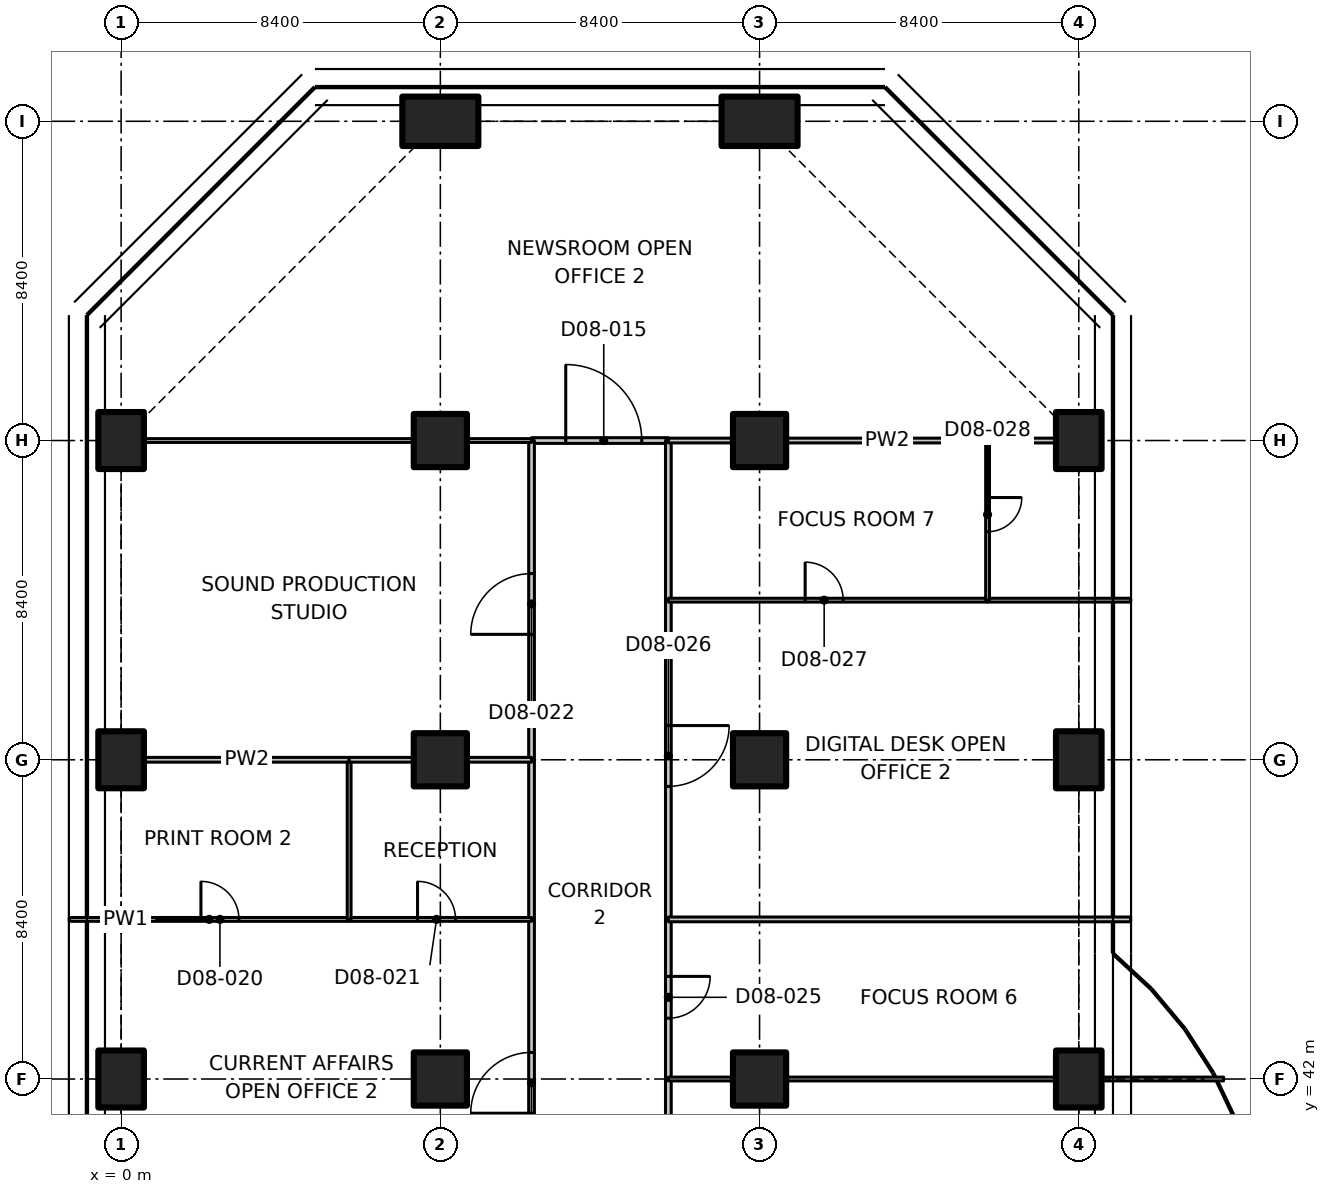
"""IFC4 building model, lengths in metres.
Left out: names, types, materials, properties, quantities, classifications, styles, units other than length and angle.
Written with IfcOpenShell. Run it as: python <this file> out.ifc"""

import sys

from ifc_helpers import new_model, si_unit, direction, frame, frame_2d, origin, origin_2d, place, context, subcontext, project, spatial, polyline, rectangle, outline, extrude, element, fill, save


model = new_model("IFC4")
c1 = context("Model", 3, precision=1e-05, world=origin(), true_north=direction((0.0, 1.0)))
c2 = subcontext(c1, "Body", "Model", "MODEL_VIEW")
j1 = project(units=[si_unit("LENGTHUNIT", "METRE"), si_unit("PLANEANGLEUNIT", "RADIAN")], contexts=[c1])
p1 = place(None, origin())
s1 = spatial("IfcSite", under=j1, at=p1, CompositionType="ELEMENT")
p2 = place(p1, origin())
s2 = spatial("IfcBuilding", under=s1, at=p2, CompositionType="ELEMENT")
p3 = place(p2, frame((0.0, 0.0, 54.5)))
s3 = spatial("IfcBuildingStorey", under=s2, at=p3, CompositionType="ELEMENT", Elevation=54.5)
for number, where, z_axis, x_axis in (
    (1, (0.0, 42.0, 0.0), (0.0, 0.0, 1.0), (1.0, 0.0, 0.0)),
    (2, (0.0, 50.4, 0.0), (0.0, 0.0, 1.0), (1.0, 0.0, 0.0)),
    (3, (0.0, 58.8, 0.0), (0.0, 0.0, 1.0), (1.0, 0.0, 0.0)),
):
    element("IfcColumn", number, at=place(p3, frame(where, z_axis=z_axis, x_axis=x_axis)), inside=s3, PredefinedType="COLUMN", context=c2, shape_type="SweptSolid", body=[
        extrude(rectangle(XDim=1.2, YDim=1.5, at=origin_2d()), origin(), (0.0, 0.0, 1.0), 3.35),
    ])
for number, where, z_axis, x_axis in (
    (4, (8.4, 42.0, 0.0), (0.0, 0.0, 1.0), (1.0, 0.0, 0.0)),
    (5, (8.4, 50.4, 0.0), (0.0, 0.0, 1.0), (1.0, 0.0, 0.0)),
    (6, (8.4, 58.8, 0.0), (0.0, 0.0, 1.0), (1.0, 0.0, 0.0)),
):
    element("IfcColumn", number, at=place(p3, frame(where, z_axis=z_axis, x_axis=x_axis)), inside=s3, PredefinedType="COLUMN", context=c2, shape_type="SweptSolid", body=[
        extrude(rectangle(XDim=1.4, YDim=1.4, at=origin_2d()), origin(), (0.0, 0.0, 1.0), 3.35),
    ])
p4 = place(p3, frame((8.4, 67.2, 0.0), z_axis=(0.0, 0.0, 1.0), x_axis=(0.0, 1.0, 0.0)))
e7 = element("IfcColumn", 7, at=p4, inside=s3, PredefinedType="COLUMN", context=c2, shape_type="SweptSolid", body=[
    extrude(rectangle(XDim=1.3, YDim=2.0, at=origin_2d()), origin(), (0.0, 0.0, 1.0), 3.35),
])
for number, where, z_axis, x_axis in (
    (8, (16.8, 42.0, 0.0), (0.0, 0.0, 1.0), (1.0, 0.0, 0.0)),
    (9, (16.8, 50.4, 0.0), (0.0, 0.0, 1.0), (1.0, 0.0, 0.0)),
    (10, (16.8, 58.8, 0.0), (0.0, 0.0, 1.0), (1.0, 0.0, 0.0)),
):
    element("IfcColumn", number, at=place(p3, frame(where, z_axis=z_axis, x_axis=x_axis)), inside=s3, PredefinedType="COLUMN", context=c2, shape_type="SweptSolid", body=[
        extrude(rectangle(XDim=1.4, YDim=1.4, at=origin_2d()), origin(), (0.0, 0.0, 1.0), 3.35),
    ])
p5 = place(p3, frame((16.8, 67.2, 0.0), z_axis=(0.0, 0.0, 1.0), x_axis=(0.0, 1.0, 0.0)))
e11 = element("IfcColumn", 11, at=p5, inside=s3, PredefinedType="COLUMN", context=c2, shape_type="SweptSolid", body=[
    extrude(rectangle(XDim=1.3, YDim=2.0, at=origin_2d()), origin(), (0.0, 0.0, 1.0), 3.35),
])
for number, where, z_axis, x_axis in (
    (12, (25.2, 42.0, 0.0), (0.0, 0.0, 1.0), (1.0, 0.0, 0.0)),
    (13, (25.2, 50.4, 0.0), (0.0, 0.0, 1.0), (1.0, 0.0, 0.0)),
    (14, (25.2, 58.8, 0.0), (0.0, 0.0, 1.0), (1.0, 0.0, 0.0)),
):
    element("IfcColumn", number, at=place(p3, frame(where, z_axis=z_axis, x_axis=x_axis)), inside=s3, PredefinedType="COLUMN", context=c2, shape_type="SweptSolid", body=[
        extrude(rectangle(XDim=1.2, YDim=1.5, at=origin_2d()), origin(), (0.0, 0.0, 1.0), 3.35),
    ])
p6 = place(p3, frame((10.8, 58.8, 0.0), z_axis=(0.0, 0.0, 1.0), x_axis=(1.0, 0.0, 0.0)))
e15 = element("IfcWall", 15, at=p6, inside=s3, PredefinedType="PARTITIONING", context=c2, shape_type="SweptSolid", body=[
    extrude(rectangle(XDim=3.6, YDim=0.15, at=frame_2d((1.8, 0.0))), origin(), (0.0, 0.0, 1.0), 3.33),
])
p7 = place(p6, frame((0.9, 0.0, 0.0)))
e16 = element("IfcOpeningElement", 16, at=p7, cuts=e15, PredefinedType="OPENING", context=c2, shape_type="SweptSolid", body=[
    extrude(rectangle(XDim=2.0, YDim=2.4, at=frame_2d((1.0, 1.2))), frame((0.0, 0.085, 0.0), z_axis=(0.0, -1.0, 0.0), x_axis=(1.0, 0.0, 0.0)), (0.0, 0.0, 1.0), 0.17),
])
p8 = place(p3, frame((10.8, 37.8, 0.0), z_axis=(0.0, 0.0, 1.0), x_axis=(0.0, 1.0, 0.0)))
e17 = element("IfcWall", 17, at=p8, inside=s3, PredefinedType="PARTITIONING", context=c2, shape_type="SweptSolid", body=[
    extrude(rectangle(XDim=8.4, YDim=0.15, at=frame_2d((4.2, 0.0))), origin(), (0.0, 0.0, 1.0), 3.33),
])
p9 = place(p8, frame((3.3, 0.0, 0.0)))
e18 = element("IfcOpeningElement", 18, at=p9, cuts=e17, PredefinedType="OPENING", context=c2, shape_type="SweptSolid", body=[
    extrude(rectangle(XDim=1.6, YDim=2.1, at=frame_2d((0.8, 1.05))), frame((0.0, 0.085, 0.0), z_axis=(0.0, -1.0, 0.0), x_axis=(1.0, 0.0, 0.0)), (0.0, 0.0, 1.0), 0.17),
])
p10 = place(p3, frame((10.8, 46.2, 0.0), z_axis=(0.0, 0.0, 1.0), x_axis=(0.0, 1.0, 0.0)))
e19 = element("IfcWall", 19, at=p10, inside=s3, PredefinedType="PARTITIONING", context=c2, shape_type="SweptSolid", body=[
    extrude(rectangle(XDim=4.2, YDim=0.15, at=frame_2d((2.1, 0.0))), origin(), (0.0, 0.0, 1.0), 3.33),
])
p11 = place(p3, frame((10.8, 50.4, 0.0), z_axis=(0.0, 0.0, 1.0), x_axis=(0.0, 1.0, 0.0)))
e20 = element("IfcWall", 20, at=p11, inside=s3, PredefinedType="PARTITIONING", context=c2, shape_type="SweptSolid", body=[
    extrude(rectangle(XDim=8.4, YDim=0.15, at=frame_2d((4.2, 0.0))), origin(), (0.0, 0.0, 1.0), 3.33),
])
p12 = place(p11, frame((3.3, 0.0, 0.0)))
e21 = element("IfcOpeningElement", 21, at=p12, cuts=e20, PredefinedType="OPENING", context=c2, shape_type="SweptSolid", body=[
    extrude(rectangle(XDim=1.6, YDim=2.1, at=frame_2d((0.8, 1.05))), frame((0.0, 0.085, 0.0), z_axis=(0.0, -1.0, 0.0), x_axis=(1.0, 0.0, 0.0)), (0.0, 0.0, 1.0), 0.17),
])
p13 = place(p3, frame((14.4, 42.0, 0.0), z_axis=(0.0, 0.0, 1.0), x_axis=(0.0, -1.0, 0.0)))
e22 = element("IfcWall", 22, at=p13, inside=s3, PredefinedType="PARTITIONING", context=c2, shape_type="SweptSolid", body=[
    extrude(rectangle(XDim=4.2, YDim=0.15, at=frame_2d((2.1, 0.0))), origin(), (0.0, 0.0, 1.0), 3.33),
])
p14 = place(p13, frame((1.2, 0.0, 0.0)))
e23 = element("IfcOpeningElement", 23, at=p14, cuts=e22, PredefinedType="OPENING", context=c2, shape_type="SweptSolid", body=[
    extrude(rectangle(XDim=1.6, YDim=2.1, at=frame_2d((0.8, 1.05))), frame((0.0, 0.085, 0.0), z_axis=(0.0, -1.0, 0.0), x_axis=(1.0, 0.0, 0.0)), (0.0, 0.0, 1.0), 0.17),
])
p15 = place(p3, frame((14.4, 46.2, 0.0), z_axis=(0.0, 0.0, 1.0), x_axis=(0.0, -1.0, 0.0)))
e24 = element("IfcWall", 24, at=p15, inside=s3, PredefinedType="PARTITIONING", context=c2, shape_type="SweptSolid", body=[
    extrude(rectangle(XDim=4.2, YDim=0.15, at=frame_2d((2.1, 0.0))), origin(), (0.0, 0.0, 1.0), 3.33),
])
p16 = place(p15, frame((1.5, 0.0, 0.0)))
e25 = element("IfcOpeningElement", 25, at=p16, cuts=e24, PredefinedType="OPENING", context=c2, shape_type="SweptSolid", body=[
    extrude(rectangle(XDim=1.1, YDim=2.1, at=frame_2d((0.55, 1.05))), frame((0.0, 0.085, 0.0), z_axis=(0.0, -1.0, 0.0), x_axis=(1.0, 0.0, 0.0)), (0.0, 0.0, 1.0), 0.17),
])
p17 = place(p3, frame((14.4, 54.6, 0.0), z_axis=(0.0, 0.0, 1.0), x_axis=(0.0, -1.0, 0.0)))
e26 = element("IfcWall", 26, at=p17, inside=s3, PredefinedType="PARTITIONING", context=c2, shape_type="SweptSolid", body=[
    extrude(rectangle(XDim=8.4, YDim=0.15, at=frame_2d((4.2, 0.0))), origin(), (0.0, 0.0, 1.0), 3.33),
])
p18 = place(p17, frame((3.3, 0.0, 0.0)))
e27 = element("IfcOpeningElement", 27, at=p18, cuts=e26, PredefinedType="OPENING", context=c2, shape_type="SweptSolid", body=[
    extrude(rectangle(XDim=1.6, YDim=2.1, at=frame_2d((0.8, 1.05))), frame((0.0, 0.085, 0.0), z_axis=(0.0, -1.0, 0.0), x_axis=(1.0, 0.0, 0.0)), (0.0, 0.0, 1.0), 0.17),
])
p19 = place(p3, frame((14.4, 58.8, 0.0), z_axis=(0.0, 0.0, 1.0), x_axis=(0.0, -1.0, 0.0)))
e28 = element("IfcWall", 28, at=p19, inside=s3, PredefinedType="PARTITIONING", context=c2, shape_type="SweptSolid", body=[
    extrude(rectangle(XDim=4.2, YDim=0.15, at=frame_2d((2.1, 0.0))), origin(), (0.0, 0.0, 1.0), 3.33),
])
p20 = place(p3, frame((10.8, 58.8, 0.0), z_axis=(0.0, 0.0, 1.0), x_axis=(-1.0, 0.0, 0.0)))
e29 = element("IfcWall", 29, at=p20, inside=s3, PredefinedType="PARTITIONING", context=c2, shape_type="SweptSolid", body=[
    extrude(rectangle(XDim=1.68, YDim=0.1, at=frame_2d((0.84, 0.0))), origin(), (0.0, 0.0, 1.0), 3.33),
])
p21 = place(p3, frame((7.68, 58.8, 0.0), z_axis=(0.0, 0.0, 1.0), x_axis=(-1.0, 0.0, 0.0)))
e30 = element("IfcWall", 30, at=p21, inside=s3, PredefinedType="PARTITIONING", context=c2, shape_type="SweptSolid", body=[
    extrude(rectangle(XDim=7.06, YDim=0.1, at=frame_2d((3.53, 0.0))), origin(), (0.0, 0.0, 1.0), 3.33),
])
p22 = place(p3, frame((22.8, 58.8, 0.0), z_axis=(0.0, 0.0, 1.0), x_axis=(-1.0, 0.0, 0.0)))
e31 = element("IfcWall", 31, at=p22, inside=s3, PredefinedType="PARTITIONING", context=c2, shape_type="SweptSolid", body=[
    extrude(rectangle(XDim=5.28, YDim=0.125, at=frame_2d((2.64, 0.0))), origin(), (0.0, 0.0, 1.0), 3.33),
])
p23 = place(p3, frame((16.08, 58.8, 0.0), z_axis=(0.0, 0.0, 1.0), x_axis=(-1.0, 0.0, 0.0)))
e32 = element("IfcWall", 32, at=p23, inside=s3, PredefinedType="PARTITIONING", context=c2, shape_type="SweptSolid", body=[
    extrude(rectangle(XDim=1.68, YDim=0.125, at=frame_2d((0.84, 0.0))), origin(), (0.0, 0.0, 1.0), 3.33),
])
p24 = place(p3, frame((24.58, 58.8, 0.0), z_axis=(0.0, 0.0, 1.0), x_axis=(-1.0, 0.0, 0.0)))
e33 = element("IfcWall", 33, at=p24, inside=s3, PredefinedType="PARTITIONING", context=c2, shape_type="SweptSolid", body=[
    extrude(rectangle(XDim=1.78, YDim=0.125, at=frame_2d((0.89, 0.0))), origin(), (0.0, 0.0, 1.0), 3.33),
])
p25 = place(p3, frame((-1.365, 46.2, 0.0), z_axis=(0.0, 0.0, 1.0), x_axis=(1.0, 0.0, 0.0)))
e34 = element("IfcWall", 34, at=p25, inside=s3, PredefinedType="PARTITIONING", context=c2, shape_type="SweptSolid", body=[
    extrude(outline(polyline([(0.0, 0.0), (7.365, 0.0), (7.365, 3.33), (1.815, 3.33), (1.813, 2.98), (0.917, 2.98), (0.915, 3.33), (0.265, 3.33), (0.0, 3.33), (0.0, 0.0)])), frame((0.0, 0.05, 0.0), z_axis=(0.0, -1.0, 0.0), x_axis=(1.0, 0.0, 0.0)), (0.0, 0.0, 1.0), 0.1),
])
p26 = place(p25, frame((3.465, 0.0, 0.0)))
e35 = element("IfcOpeningElement", 35, at=p26, cuts=e34, PredefinedType="OPENING", context=c2, shape_type="SweptSolid", body=[
    extrude(rectangle(XDim=1.0, YDim=2.1, at=frame_2d((0.5, 1.05))), frame((0.0, 0.06, 0.0), z_axis=(0.0, -1.0, 0.0), x_axis=(1.0, 0.0, 0.0)), (0.0, 0.0, 1.0), 0.12),
])
p27 = place(p3, frame((6.0, 46.2, 0.0), z_axis=(0.0, 0.0, 1.0), x_axis=(1.0, 0.0, 0.0)))
e36 = element("IfcWall", 36, at=p27, inside=s3, PredefinedType="PARTITIONING", context=c2, shape_type="SweptSolid", body=[
    extrude(rectangle(XDim=4.8, YDim=0.1, at=frame_2d((2.4, 0.0))), origin(), (0.0, 0.0, 1.0), 3.33),
])
p28 = place(p27, frame((1.8, 0.0, 0.0)))
e37 = element("IfcOpeningElement", 37, at=p28, cuts=e36, PredefinedType="OPENING", context=c2, shape_type="SweptSolid", body=[
    extrude(rectangle(XDim=1.0, YDim=2.1, at=frame_2d((0.5, 1.05))), frame((0.0, 0.06, 0.0), z_axis=(0.0, -1.0, 0.0), x_axis=(1.0, 0.0, 0.0)), (0.0, 0.0, 1.0), 0.12),
])
p29 = place(p3, frame((6.0, 50.4, 0.0), z_axis=(0.0, 0.0, 1.0), x_axis=(0.0, -1.0, 0.0)))
e38 = element("IfcWall", 38, at=p29, inside=s3, PredefinedType="PARTITIONING", context=c2, shape_type="SweptSolid", body=[
    extrude(rectangle(XDim=4.2, YDim=0.1, at=frame_2d((2.1, 0.0))), origin(), (0.0, 0.0, 1.0), 3.33),
])
p30 = place(p3, frame((0.62, 50.4, 0.0), z_axis=(0.0, 0.0, 1.0), x_axis=(1.0, 0.0, 0.0)))
e39 = element("IfcWall", 39, at=p30, inside=s3, PredefinedType="PARTITIONING", context=c2, shape_type="SweptSolid", body=[
    extrude(rectangle(XDim=5.38, YDim=0.125, at=frame_2d((2.69, 0.0))), origin(), (0.0, 0.0, 1.0), 3.33),
])
for number, where, z_axis, x_axis in (
    (40, (6.0, 50.4, 0.0), (0.0, 0.0, 1.0), (1.0, 0.0, 0.0)),
    (41, (9.12, 50.4, 0.0), (0.0, 0.0, 1.0), (1.0, 0.0, 0.0)),
):
    element("IfcWall", number, at=place(p3, frame(where, z_axis=z_axis, x_axis=x_axis)), inside=s3, PredefinedType="PARTITIONING", context=c2, shape_type="SweptSolid", body=[
        extrude(rectangle(XDim=1.68, YDim=0.125, at=frame_2d((0.84, 0.0))), origin(), (0.0, 0.0, 1.0), 3.33),
    ])
p31 = place(p3, frame((14.4, 42.0, 0.0), z_axis=(0.0, 0.0, 1.0), x_axis=(1.0, 0.0, 0.0)))
e42 = element("IfcWall", 42, at=p31, inside=s3, PredefinedType="PARTITIONING", context=c2, shape_type="SweptSolid", body=[
    extrude(rectangle(XDim=1.68, YDim=0.1, at=frame_2d((0.84, 0.0))), origin(), (0.0, 0.0, 1.0), 3.33),
])
p32 = place(p3, frame((17.52, 42.0, 0.0), z_axis=(0.0, 0.0, 1.0), x_axis=(1.0, 0.0, 0.0)))
e43 = element("IfcWall", 43, at=p32, inside=s3, PredefinedType="PARTITIONING", context=c2, shape_type="SweptSolid", body=[
    extrude(rectangle(XDim=7.06, YDim=0.1, at=frame_2d((3.53, 0.0))), origin(), (0.0, 0.0, 1.0), 3.33),
])
p33 = place(p3, frame((25.82, 42.0, 0.0), z_axis=(0.0, 0.0, 1.0), x_axis=(1.0, 0.0, 0.0)))
e44 = element("IfcWall", 44, at=p33, inside=s3, PredefinedType="PARTITIONING", context=c2, shape_type="SweptSolid", body=[
    extrude(rectangle(XDim=3.191, YDim=0.1, at=frame_2d((1.596, 0.0))), origin(), (0.0, 0.0, 1.0), 2.98),
])
p34 = place(p3, frame((14.4, 46.2, 0.0), z_axis=(0.0, 0.0, 1.0), x_axis=(1.0, 0.0, 0.0)))
e45 = element("IfcWall", 45, at=p34, inside=s3, PredefinedType="PARTITIONING", context=c2, shape_type="SweptSolid", body=[
    extrude(outline(polyline([(0.0, 0.0), (12.165, 0.0), (12.165, 3.33), (11.9, 3.33), (11.25, 3.33), (11.248, 2.98), (10.352, 2.98), (10.35, 3.33), (0.0, 3.33), (0.0, 0.0)])), frame((0.0, 0.062, 0.0), z_axis=(0.0, -1.0, 0.0), x_axis=(1.0, 0.0, 0.0)), (0.0, 0.0, 1.0), 0.125),
])
p35 = place(p3, frame((14.4, 54.6, 0.0), z_axis=(0.0, 0.0, 1.0), x_axis=(1.0, 0.0, 0.0)))
e46 = element("IfcWall", 46, at=p35, inside=s3, PredefinedType="PARTITIONING", context=c2, shape_type="SweptSolid", body=[
    extrude(rectangle(XDim=8.4, YDim=0.1, at=frame_2d((4.2, 0.0))), origin(), (0.0, 0.0, 1.0), 3.33),
])
p36 = place(p35, frame((3.6, 0.0, 0.0)))
e47 = element("IfcOpeningElement", 47, at=p36, cuts=e46, PredefinedType="OPENING", context=c2, shape_type="SweptSolid", body=[
    extrude(rectangle(XDim=1.0, YDim=2.1, at=frame_2d((0.5, 1.05))), frame((0.0, 0.06, 0.0), z_axis=(0.0, -1.0, 0.0), x_axis=(1.0, 0.0, 0.0)), (0.0, 0.0, 1.0), 0.12),
])
p37 = place(p3, frame((22.8, 54.6, 0.0), z_axis=(0.0, 0.0, 1.0), x_axis=(1.0, 0.0, 0.0)))
e48 = element("IfcWall", 48, at=p37, inside=s3, PredefinedType="PARTITIONING", context=c2, shape_type="SweptSolid", body=[
    extrude(rectangle(XDim=3.765, YDim=0.1, at=frame_2d((1.882, 0.0))), origin(), (0.0, 0.0, 1.0), 2.98),
])
p38 = place(p3, frame((22.8, 58.8, 0.0), z_axis=(0.0, 0.0, 1.0), x_axis=(0.0, -1.0, 0.0)))
e49 = element("IfcWall", 49, at=p38, inside=s3, PredefinedType="PARTITIONING", context=c2, shape_type="SweptSolid", body=[
    extrude(rectangle(XDim=4.2, YDim=0.1, at=frame_2d((2.1, 0.0))), origin(), (0.0, 0.0, 1.0), 3.33),
])
p39 = place(p38, frame((1.5, 0.0, 0.0)))
e50 = element("IfcOpeningElement", 50, at=p39, cuts=e49, PredefinedType="OPENING", context=c2, shape_type="SweptSolid", body=[
    extrude(rectangle(XDim=0.9, YDim=2.1, at=frame_2d((0.45, 1.05))), frame((0.0, 0.06, 0.0), z_axis=(0.0, -1.0, 0.0), x_axis=(1.0, 0.0, 0.0)), (0.0, 0.0, 1.0), 0.12),
])
p40 = place(p7, origin())
e51 = element("IfcDoor", 51, at=p40, inside=s3, OperationType="DOUBLE_DOOR_SINGLE_SWING", PredefinedType="DOOR", context=c2, shape_type="SweptSolid", body=[
    extrude(rectangle(XDim=2.0, YDim=2.4, at=frame_2d((1.0, 1.2))), frame((0.0, 0.025, 0.0), z_axis=(0.0, -1.0, 0.0), x_axis=(1.0, 0.0, 0.0)), (0.0, 0.0, 1.0), 0.05),
])
fill(e16, e51)
p41 = place(p9, origin())
e52 = element("IfcDoor", 52, at=p41, inside=s3, OperationType="DOUBLE_DOOR_SINGLE_SWING", PredefinedType="DOOR", context=c2, shape_type="SweptSolid", body=[
    extrude(rectangle(XDim=1.6, YDim=2.1, at=frame_2d((0.8, 1.05))), frame((0.0, 0.025, 0.0), z_axis=(0.0, -1.0, 0.0), x_axis=(1.0, 0.0, 0.0)), (0.0, 0.0, 1.0), 0.05),
])
fill(e18, e52)
p42 = place(p26, origin())
e53 = element("IfcDoor", 53, at=p42, inside=s3, OperationType="SINGLE_SWING_LEFT", PredefinedType="DOOR", context=c2, shape_type="SweptSolid", body=[
    extrude(rectangle(XDim=1.0, YDim=2.1, at=frame_2d((0.5, 1.05))), frame((0.0, 0.025, 0.0), z_axis=(0.0, -1.0, 0.0), x_axis=(1.0, 0.0, 0.0)), (0.0, 0.0, 1.0), 0.05),
])
fill(e35, e53)
p43 = place(p28, origin())
e54 = element("IfcDoor", 54, at=p43, inside=s3, OperationType="SINGLE_SWING_LEFT", PredefinedType="DOOR", context=c2, shape_type="SweptSolid", body=[
    extrude(rectangle(XDim=1.0, YDim=2.1, at=frame_2d((0.5, 1.05))), frame((0.0, 0.025, 0.0), z_axis=(0.0, -1.0, 0.0), x_axis=(1.0, 0.0, 0.0)), (0.0, 0.0, 1.0), 0.05),
])
fill(e37, e54)
p44 = place(p12, origin())
e55 = element("IfcDoor", 55, at=p44, inside=s3, OperationType="DOUBLE_DOOR_SINGLE_SWING", PredefinedType="DOOR", context=c2, shape_type="SweptSolid", body=[
    extrude(rectangle(XDim=1.6, YDim=2.1, at=frame_2d((0.8, 1.05))), frame((0.0, 0.025, 0.0), z_axis=(0.0, -1.0, 0.0), x_axis=(1.0, 0.0, 0.0)), (0.0, 0.0, 1.0), 0.05),
])
fill(e21, e55)
p45 = place(p16, origin())
e56 = element("IfcDoor", 56, at=p45, inside=s3, OperationType="SINGLE_SWING_LEFT", PredefinedType="DOOR", context=c2, shape_type="SweptSolid", body=[
    extrude(rectangle(XDim=1.1, YDim=2.1, at=frame_2d((0.55, 1.05))), frame((0.0, 0.025, 0.0), z_axis=(0.0, -1.0, 0.0), x_axis=(1.0, 0.0, 0.0)), (0.0, 0.0, 1.0), 0.05),
])
fill(e25, e56)
p46 = place(p18, origin())
e57 = element("IfcDoor", 57, at=p46, inside=s3, OperationType="DOUBLE_DOOR_SINGLE_SWING", PredefinedType="DOOR", context=c2, shape_type="SweptSolid", body=[
    extrude(rectangle(XDim=1.6, YDim=2.1, at=frame_2d((0.8, 1.05))), frame((0.0, 0.025, 0.0), z_axis=(0.0, -1.0, 0.0), x_axis=(1.0, 0.0, 0.0)), (0.0, 0.0, 1.0), 0.05),
])
fill(e27, e57)
p47 = place(p36, origin())
e58 = element("IfcDoor", 58, at=p47, inside=s3, OperationType="SINGLE_SWING_LEFT", PredefinedType="DOOR", context=c2, shape_type="SweptSolid", body=[
    extrude(rectangle(XDim=1.0, YDim=2.1, at=frame_2d((0.5, 1.05))), frame((0.0, 0.025, 0.0), z_axis=(0.0, -1.0, 0.0), x_axis=(1.0, 0.0, 0.0)), (0.0, 0.0, 1.0), 0.05),
])
fill(e47, e58)
p48 = place(p39, origin())
e59 = element("IfcDoor", 59, at=p48, inside=s3, OperationType="SINGLE_SWING_LEFT", PredefinedType="DOOR", context=c2, shape_type="SweptSolid", body=[
    extrude(rectangle(XDim=0.9, YDim=2.1, at=frame_2d((0.45, 1.05))), frame((0.0, 0.025, 0.0), z_axis=(0.0, -1.0, 0.0), x_axis=(1.0, 0.0, 0.0)), (0.0, 0.0, 1.0), 0.05),
])
fill(e50, e59)
save(model, sys.argv[1])
